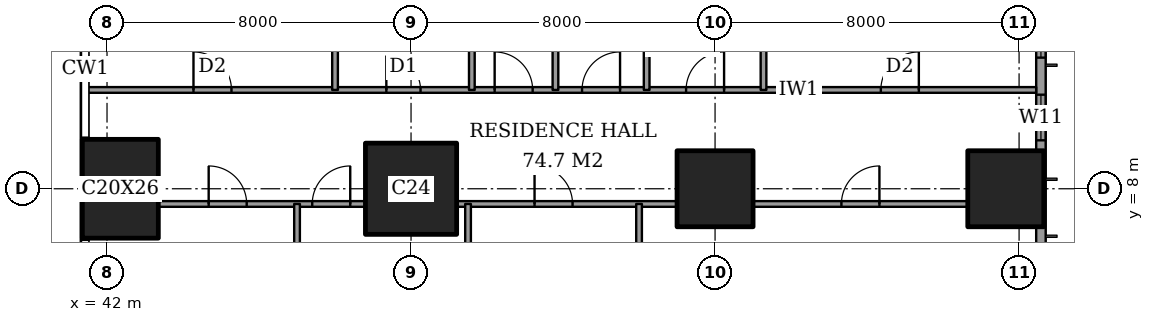
"""IFC4 building model, lengths in metres.
Left out: names, types, materials, properties, quantities, classifications, styles, units other than length and angle.
Written with IfcOpenShell. Run it as: python <this file> out.ifc"""

import sys

from ifc_helpers import new_model, si_unit, direction, frame, frame_2d, origin, origin_2d, place, context, subcontext, project, spatial, rectangle, extrude, element, fill, save


model = new_model("IFC4")
c1 = context("Model", 3, precision=1e-05, world=origin(), true_north=direction((0.0, 1.0)))
c2 = subcontext(c1, "Body", "Model", "MODEL_VIEW")
j1 = project(units=[si_unit("LENGTHUNIT", "METRE"), si_unit("PLANEANGLEUNIT", "RADIAN")], contexts=[c1])
p1 = place(None, origin())
s1 = spatial("IfcSite", under=j1, at=p1, CompositionType="ELEMENT")
p2 = place(p1, origin())
s2 = spatial("IfcBuilding", under=s1, at=p2, CompositionType="ELEMENT")
p3 = place(p2, frame((0.0, 0.0, 110.6)))
s3 = spatial("IfcBuildingStorey", under=s2, at=p3, CompositionType="ELEMENT", Elevation=110.6)
p4 = place(p3, frame((42.35, 8.0, 0.0), z_axis=(0.0, 0.0, 1.0), x_axis=(1.0, 0.0, 0.0)))
e1 = element("IfcColumn", 1, at=p4, inside=s3, PredefinedType="COLUMN", context=c2, shape_type="SweptSolid", body=[
    extrude(rectangle(XDim=2.0, YDim=2.6, at=origin_2d()), origin(), (0.0, 0.0, 1.0), 3.6),
])
p5 = place(p3, frame((50.0, 8.0, 0.0), z_axis=(0.0, 0.0, 1.0), x_axis=(1.0, 0.0, 0.0)))
e2 = element("IfcColumn", 2, at=p5, inside=s3, PredefinedType="COLUMN", context=c2, shape_type="SweptSolid", body=[
    extrude(rectangle(XDim=2.4, YDim=2.4, at=origin_2d()), origin(), (0.0, 0.0, 1.0), 3.6),
])
for number, where, z_axis, x_axis in (
    (3, (58.0, 8.0, 0.0), (0.0, 0.0, 1.0), (1.0, 0.0, 0.0)),
    (4, (65.65, 8.0, 0.0), (0.0, 0.0, 1.0), (1.0, 0.0, 0.0)),
):
    element("IfcColumn", number, at=place(p3, frame(where, z_axis=z_axis, x_axis=x_axis)), inside=s3, PredefinedType="COLUMN", context=c2, shape_type="SweptSolid", body=[
        extrude(rectangle(XDim=2.0, YDim=2.0, at=origin_2d()), origin(), (0.0, 0.0, 1.0), 3.6),
    ])
p6 = place(p3, frame((66.575, 3.175, 0.0), z_axis=(0.0, 0.0, 1.0), x_axis=(0.0, 1.0, 0.0)))
e5 = element("IfcWall", 5, at=p6, inside=s3, PredefinedType="SOLIDWALL", context=c2, shape_type="SweptSolid", body=[
    extrude(rectangle(XDim=41.65, YDim=0.25, at=frame_2d((20.825, 0.0))), origin(), (0.0, 0.0, 1.0), 3.6),
])
p7 = place(p6, frame((0.775, 0.0, 0.4)))
e6 = element("IfcOpeningElement", 6, at=p7, cuts=e5, PredefinedType="OPENING", context=c2, shape_type="SweptSolid", body=[
    extrude(rectangle(XDim=2.4, YDim=2.2, at=frame_2d((1.2, 1.1))), frame((0.0, 0.135, 0.0), z_axis=(0.0, -1.0, 0.0), x_axis=(1.0, 0.0, 0.0)), (0.0, 0.0, 1.0), 0.27),
])
p8 = place(p6, frame((6.1, 0.0, 0.4)))
e7 = element("IfcOpeningElement", 7, at=p8, cuts=e5, PredefinedType="OPENING", context=c2, shape_type="SweptSolid", body=[
    extrude(rectangle(XDim=1.2, YDim=2.2, at=frame_2d((0.6, 1.1))), frame((0.0, 0.135, 0.0), z_axis=(0.0, -1.0, 0.0), x_axis=(1.0, 0.0, 0.0)), (0.0, 0.0, 1.0), 0.27),
])
p9 = place(p6, frame((8.275, 0.0, 0.4)))
e8 = element("IfcOpeningElement", 8, at=p9, cuts=e5, PredefinedType="OPENING", context=c2, shape_type="SweptSolid", body=[
    extrude(rectangle(XDim=2.4, YDim=2.2, at=frame_2d((1.2, 1.1))), frame((0.0, 0.135, 0.0), z_axis=(0.0, -1.0, 0.0), x_axis=(1.0, 0.0, 0.0)), (0.0, 0.0, 1.0), 0.27),
])
p10 = place(p6, frame((15.775, 0.0, 0.4)))
e9 = element("IfcOpeningElement", 9, at=p10, cuts=e5, PredefinedType="OPENING", context=c2, shape_type="SweptSolid", body=[
    extrude(rectangle(XDim=2.4, YDim=2.2, at=frame_2d((1.2, 1.1))), frame((0.0, 0.135, 0.0), z_axis=(0.0, -1.0, 0.0), x_axis=(1.0, 0.0, 0.0)), (0.0, 0.0, 1.0), 0.27),
])
p11 = place(p6, frame((23.475, 0.0, 0.4)))
e10 = element("IfcOpeningElement", 10, at=p11, cuts=e5, PredefinedType="OPENING", context=c2, shape_type="SweptSolid", body=[
    extrude(rectangle(XDim=2.4, YDim=2.2, at=frame_2d((1.2, 1.1))), frame((0.0, 0.135, 0.0), z_axis=(0.0, -1.0, 0.0), x_axis=(1.0, 0.0, 0.0)), (0.0, 0.0, 1.0), 0.27),
])
p12 = place(p6, frame((30.975, 0.0, 0.4)))
e11 = element("IfcOpeningElement", 11, at=p12, cuts=e5, PredefinedType="OPENING", context=c2, shape_type="SweptSolid", body=[
    extrude(rectangle(XDim=2.4, YDim=2.2, at=frame_2d((1.2, 1.1))), frame((0.0, 0.135, 0.0), z_axis=(0.0, -1.0, 0.0), x_axis=(1.0, 0.0, 0.0)), (0.0, 0.0, 1.0), 0.27),
])
p13 = place(p6, frame((34.5, 0.0, 0.4)))
e12 = element("IfcOpeningElement", 12, at=p13, cuts=e5, PredefinedType="OPENING", context=c2, shape_type="SweptSolid", body=[
    extrude(rectangle(XDim=1.2, YDim=2.2, at=frame_2d((0.6, 1.1))), frame((0.0, 0.135, 0.0), z_axis=(0.0, -1.0, 0.0), x_axis=(1.0, 0.0, 0.0)), (0.0, 0.0, 1.0), 0.27),
])
p14 = place(p6, frame((38.475, 0.0, 0.4)))
e13 = element("IfcOpeningElement", 13, at=p14, cuts=e5, PredefinedType="OPENING", context=c2, shape_type="SweptSolid", body=[
    extrude(rectangle(XDim=2.4, YDim=2.2, at=frame_2d((1.2, 1.1))), frame((0.0, 0.135, 0.0), z_axis=(0.0, -1.0, 0.0), x_axis=(1.0, 0.0, 0.0)), (0.0, 0.0, 1.0), 0.27),
])
p15 = place(p3, frame((43.35, 7.6, 0.0), z_axis=(0.0, 0.0, 1.0), x_axis=(1.0, 0.0, 0.0)))
e14 = element("IfcWall", 14, at=p15, inside=s3, PredefinedType="PARTITIONING", context=c2, shape_type="SweptSolid", body=[
    extrude(rectangle(XDim=5.45, YDim=0.15, at=frame_2d((2.725, 0.0))), origin(), (0.0, 0.0, 1.0), 3.35),
])
p16 = place(p15, frame((4.05, 0.0, 0.0)))
e15 = element("IfcOpeningElement", 15, at=p16, cuts=e14, PredefinedType="OPENING", context=c2, shape_type="SweptSolid", body=[
    extrude(rectangle(XDim=1.0, YDim=2.1, at=frame_2d((0.5, 1.05))), frame((0.0, 0.085, 0.0), z_axis=(0.0, -1.0, 0.0), x_axis=(1.0, 0.0, 0.0)), (0.0, 0.0, 1.0), 0.17),
])
p17 = place(p15, frame((1.325, 0.0, 0.0)))
e16 = element("IfcOpeningElement", 16, at=p17, cuts=e14, PredefinedType="OPENING", context=c2, shape_type="SweptSolid", body=[
    extrude(rectangle(XDim=1.0, YDim=2.1, at=frame_2d((0.5, 1.05))), frame((0.0, 0.085, 0.0), z_axis=(0.0, -1.0, 0.0), x_axis=(1.0, 0.0, 0.0)), (0.0, 0.0, 1.0), 0.17),
])
p18 = place(p3, frame((51.2, 7.6, 0.0), z_axis=(0.0, 0.0, 1.0), x_axis=(1.0, 0.0, 0.0)))
e17 = element("IfcWall", 17, at=p18, inside=s3, PredefinedType="PARTITIONING", context=c2, shape_type="SweptSolid", body=[
    extrude(rectangle(XDim=5.8, YDim=0.15, at=frame_2d((2.9, 0.0))), origin(), (0.0, 0.0, 1.0), 3.35),
])
p19 = place(p18, frame((2.05, 0.0, 0.0)))
e18 = element("IfcOpeningElement", 18, at=p19, cuts=e17, PredefinedType="OPENING", context=c2, shape_type="SweptSolid", body=[
    extrude(rectangle(XDim=1.0, YDim=2.1, at=frame_2d((0.5, 1.05))), frame((0.0, 0.085, 0.0), z_axis=(0.0, -1.0, 0.0), x_axis=(1.0, 0.0, 0.0)), (0.0, 0.0, 1.0), 0.17),
])
p20 = place(p3, frame((59.0, 7.6, 0.0), z_axis=(0.0, 0.0, 1.0), x_axis=(1.0, 0.0, 0.0)))
e19 = element("IfcWall", 19, at=p20, inside=s3, PredefinedType="PARTITIONING", context=c2, shape_type="SweptSolid", body=[
    extrude(rectangle(XDim=5.65, YDim=0.15, at=frame_2d((2.825, 0.0))), origin(), (0.0, 0.0, 1.0), 3.35),
])
p21 = place(p20, frame((2.325, 0.0, 0.0)))
e20 = element("IfcOpeningElement", 20, at=p21, cuts=e19, PredefinedType="OPENING", context=c2, shape_type="SweptSolid", body=[
    extrude(rectangle(XDim=1.0, YDim=2.1, at=frame_2d((0.5, 1.05))), frame((0.0, 0.085, 0.0), z_axis=(0.0, -1.0, 0.0), x_axis=(1.0, 0.0, 0.0)), (0.0, 0.0, 1.0), 0.17),
])
p22 = place(p3, frame((41.439, 10.6, 0.0), z_axis=(0.0, 0.0, 1.0), x_axis=(1.0, 0.0, 0.0)))
e21 = element("IfcWall", 21, at=p22, inside=s3, PredefinedType="PARTITIONING", context=c2, shape_type="SweptSolid", body=[
    extrude(rectangle(XDim=25.011, YDim=0.15, at=frame_2d((12.505, 0.0))), origin(), (0.0, 0.0, 1.0), 3.35),
])
p23 = place(p22, frame((10.761, 0.0, 0.0)))
e22 = element("IfcOpeningElement", 22, at=p23, cuts=e21, PredefinedType="OPENING", context=c2, shape_type="SweptSolid", body=[
    extrude(rectangle(XDim=1.0, YDim=2.1, at=frame_2d((0.5, 1.05))), frame((0.0, 0.085, 0.0), z_axis=(0.0, -1.0, 0.0), x_axis=(1.0, 0.0, 0.0)), (0.0, 0.0, 1.0), 0.17),
])
p24 = place(p22, frame((20.924, 0.0, 0.0)))
e23 = element("IfcOpeningElement", 23, at=p24, cuts=e21, PredefinedType="OPENING", context=c2, shape_type="SweptSolid", body=[
    extrude(rectangle(XDim=1.0, YDim=2.1, at=frame_2d((0.5, 1.05))), frame((0.0, 0.085, 0.0), z_axis=(0.0, -1.0, 0.0), x_axis=(1.0, 0.0, 0.0)), (0.0, 0.0, 1.0), 0.17),
])
p25 = place(p22, frame((15.799, 0.0, 0.0)))
e24 = element("IfcOpeningElement", 24, at=p25, cuts=e21, PredefinedType="OPENING", context=c2, shape_type="SweptSolid", body=[
    extrude(rectangle(XDim=1.0, YDim=2.1, at=frame_2d((0.5, 1.05))), frame((0.0, 0.085, 0.0), z_axis=(0.0, -1.0, 0.0), x_axis=(1.0, 0.0, 0.0)), (0.0, 0.0, 1.0), 0.17),
])
p26 = place(p22, frame((13.061, 0.0, 0.0)))
e25 = element("IfcOpeningElement", 25, at=p26, cuts=e21, PredefinedType="OPENING", context=c2, shape_type="SweptSolid", body=[
    extrude(rectangle(XDim=1.0, YDim=2.1, at=frame_2d((0.5, 1.05))), frame((0.0, 0.085, 0.0), z_axis=(0.0, -1.0, 0.0), x_axis=(1.0, 0.0, 0.0)), (0.0, 0.0, 1.0), 0.17),
])
p27 = place(p22, frame((7.911, 0.0, 0.0)))
e26 = element("IfcOpeningElement", 26, at=p27, cuts=e21, PredefinedType="OPENING", context=c2, shape_type="SweptSolid", body=[
    extrude(rectangle(XDim=0.9, YDim=2.1, at=frame_2d((0.45, 1.05))), frame((0.0, 0.085, 0.0), z_axis=(0.0, -1.0, 0.0), x_axis=(1.0, 0.0, 0.0)), (0.0, 0.0, 1.0), 0.17),
])
p28 = place(p22, frame((2.836, 0.0, 0.0)))
e27 = element("IfcOpeningElement", 27, at=p28, cuts=e21, PredefinedType="OPENING", context=c2, shape_type="SweptSolid", body=[
    extrude(rectangle(XDim=1.0, YDim=2.1, at=frame_2d((0.5, 1.05))), frame((0.0, 0.085, 0.0), z_axis=(0.0, -1.0, 0.0), x_axis=(1.0, 0.0, 0.0)), (0.0, 0.0, 1.0), 0.17),
])
p29 = place(p3, frame((47.0, -0.45, 0.0), z_axis=(0.0, 0.0, 1.0), x_axis=(0.0, 1.0, 0.0)))
e28 = element("IfcWall", 28, at=p29, inside=s3, PredefinedType="PARTITIONING", context=c2, shape_type="SweptSolid", body=[
    extrude(rectangle(XDim=8.05, YDim=0.15, at=frame_2d((4.025, 0.0))), origin(), (0.0, 0.0, 1.0), 3.35),
])
p30 = place(p3, frame((48.0, 10.6, 0.0), z_axis=(0.0, 0.0, 1.0), x_axis=(0.0, 1.0, 0.0)))
e29 = element("IfcWall", 29, at=p30, inside=s3, PredefinedType="PARTITIONING", context=c2, shape_type="SweptSolid", body=[
    extrude(rectangle(XDim=13.4, YDim=0.15, at=frame_2d((6.7, 0.0))), origin(), (0.0, 0.0, 1.0), 3.35),
])
p31 = place(p30, frame((10.8, 0.0, 0.0)))
e30 = element("IfcOpeningElement", 30, at=p31, cuts=e29, PredefinedType="OPENING", context=c2, shape_type="SweptSolid", body=[
    extrude(rectangle(XDim=1.2, YDim=2.4, at=frame_2d((0.6, 1.2))), frame((0.0, 0.085, 0.0), z_axis=(0.0, -1.0, 0.0), x_axis=(1.0, 0.0, 0.0)), (0.0, 0.0, 1.0), 0.17),
])
p32 = place(p30, frame((6.7, 0.0, 0.0)))
e31 = element("IfcOpeningElement", 31, at=p32, cuts=e29, PredefinedType="OPENING", context=c2, shape_type="SweptSolid", body=[
    extrude(rectangle(XDim=0.9, YDim=2.1, at=frame_2d((0.45, 1.05))), frame((0.0, 0.085, 0.0), z_axis=(0.0, -1.0, 0.0), x_axis=(1.0, 0.0, 0.0)), (0.0, 0.0, 1.0), 0.17),
])
p33 = place(p3, frame((51.5, -0.45, 0.0), z_axis=(0.0, 0.0, 1.0), x_axis=(0.0, 1.0, 0.0)))
e32 = element("IfcWall", 32, at=p33, inside=s3, PredefinedType="PARTITIONING", context=c2, shape_type="SweptSolid", body=[
    extrude(rectangle(XDim=8.05, YDim=0.15, at=frame_2d((4.025, 0.0))), origin(), (0.0, 0.0, 1.0), 3.35),
])
for number, where, z_axis, x_axis in (
    (33, (51.6, 10.6, 0.0), (0.0, 0.0, 1.0), (0.0, 1.0, 0.0)),
    (34, (53.8, 10.6, 0.0), (0.0, 0.0, 1.0), (0.0, 1.0, 0.0)),
):
    element("IfcWall", number, at=place(p3, frame(where, z_axis=z_axis, x_axis=x_axis)), inside=s3, PredefinedType="PARTITIONING", context=c2, shape_type="SweptSolid", body=[
        extrude(rectangle(XDim=4.0, YDim=0.15, at=frame_2d((2.0, 0.0))), origin(), (0.0, 0.0, 1.0), 3.35),
    ])
p34 = place(p3, frame((56.0, -0.45, 0.0), z_axis=(0.0, 0.0, 1.0), x_axis=(0.0, 1.0, 0.0)))
e35 = element("IfcWall", 35, at=p34, inside=s3, PredefinedType="PARTITIONING", context=c2, shape_type="SweptSolid", body=[
    extrude(rectangle(XDim=8.05, YDim=0.15, at=frame_2d((4.025, 0.0))), origin(), (0.0, 0.0, 1.0), 3.35),
])
p35 = place(p3, frame((56.2, 10.6, 0.0), z_axis=(0.0, 0.0, 1.0), x_axis=(0.0, 1.0, 0.0)))
e36 = element("IfcWall", 36, at=p35, inside=s3, PredefinedType="PARTITIONING", context=c2, shape_type="SweptSolid", body=[
    extrude(rectangle(XDim=11.0, YDim=0.15, at=frame_2d((5.5, 0.0))), origin(), (0.0, 0.0, 1.0), 3.35),
])
p36 = place(p35, frame((7.0, 0.0, 0.0)))
e37 = element("IfcOpeningElement", 37, at=p36, cuts=e36, PredefinedType="OPENING", context=c2, shape_type="SweptSolid", body=[
    extrude(rectangle(XDim=1.0, YDim=2.1, at=frame_2d((0.5, 1.05))), frame((0.0, 0.085, 0.0), z_axis=(0.0, -1.0, 0.0), x_axis=(1.0, 0.0, 0.0)), (0.0, 0.0, 1.0), 0.17),
])
p37 = place(p3, frame((59.275, 10.6, 0.0), z_axis=(0.0, 0.0, 1.0), x_axis=(0.0, 1.0, 0.0)))
e38 = element("IfcWall", 38, at=p37, inside=s3, PredefinedType="PARTITIONING", context=c2, shape_type="SweptSolid", body=[
    extrude(rectangle(XDim=4.2, YDim=0.15, at=frame_2d((2.1, 0.0))), origin(), (0.0, 0.0, 1.0), 3.35),
])
p38 = place(p8, origin())
e39 = element("IfcWindow", 39, at=p38, inside=s3, PartitioningType="SINGLE_PANEL", PredefinedType="WINDOW", context=c2, shape_type="SweptSolid", body=[
    extrude(rectangle(XDim=1.2, YDim=2.2, at=frame_2d((0.6, 1.1))), frame((0.0, 0.03, 0.0), z_axis=(0.0, -1.0, 0.0), x_axis=(1.0, 0.0, 0.0)), (0.0, 0.0, 1.0), 0.06),
])
fill(e7, e39)
p39 = place(p9, origin())
e40 = element("IfcWindow", 40, at=p39, inside=s3, PartitioningType="SINGLE_PANEL", PredefinedType="WINDOW", context=c2, shape_type="SweptSolid", body=[
    extrude(rectangle(XDim=2.4, YDim=2.2, at=frame_2d((1.2, 1.1))), frame((0.0, 0.03, 0.0), z_axis=(0.0, -1.0, 0.0), x_axis=(1.0, 0.0, 0.0)), (0.0, 0.0, 1.0), 0.06),
])
fill(e8, e40)
p40 = place(p21, origin())
e41 = element("IfcDoor", 41, at=p40, inside=s3, OperationType="SINGLE_SWING_LEFT", PredefinedType="DOOR", context=c2, shape_type="SweptSolid", body=[
    extrude(rectangle(XDim=1.0, YDim=2.1, at=frame_2d((0.5, 1.05))), frame((0.0, 0.025, 0.0), z_axis=(0.0, -1.0, 0.0), x_axis=(1.0, 0.0, 0.0)), (0.0, 0.0, 1.0), 0.05),
])
fill(e20, e41)
p41 = place(p19, origin())
e42 = element("IfcDoor", 42, at=p41, inside=s3, OperationType="SINGLE_SWING_RIGHT", PredefinedType="DOOR", context=c2, shape_type="SweptSolid", body=[
    extrude(rectangle(XDim=1.0, YDim=2.1, at=frame_2d((0.5, 1.05))), frame((0.0, 0.025, 0.0), z_axis=(0.0, -1.0, 0.0), x_axis=(1.0, 0.0, 0.0)), (0.0, 0.0, 1.0), 0.05),
])
fill(e18, e42)
p42 = place(p16, origin())
e43 = element("IfcDoor", 43, at=p42, inside=s3, OperationType="SINGLE_SWING_LEFT", PredefinedType="DOOR", context=c2, shape_type="SweptSolid", body=[
    extrude(rectangle(XDim=1.0, YDim=2.1, at=frame_2d((0.5, 1.05))), frame((0.0, 0.025, 0.0), z_axis=(0.0, -1.0, 0.0), x_axis=(1.0, 0.0, 0.0)), (0.0, 0.0, 1.0), 0.05),
])
fill(e15, e43)
p43 = place(p17, origin())
e44 = element("IfcDoor", 44, at=p43, inside=s3, OperationType="SINGLE_SWING_RIGHT", PredefinedType="DOOR", context=c2, shape_type="SweptSolid", body=[
    extrude(rectangle(XDim=1.0, YDim=2.1, at=frame_2d((0.5, 1.05))), frame((0.0, 0.025, 0.0), z_axis=(0.0, -1.0, 0.0), x_axis=(1.0, 0.0, 0.0)), (0.0, 0.0, 1.0), 0.05),
])
fill(e16, e44)
p44 = place(p23, origin())
e45 = element("IfcDoor", 45, at=p44, inside=s3, OperationType="SINGLE_SWING_RIGHT", PredefinedType="DOOR", context=c2, shape_type="SweptSolid", body=[
    extrude(rectangle(XDim=1.0, YDim=2.1, at=frame_2d((0.5, 1.05))), frame((0.0, 0.025, 0.0), z_axis=(0.0, -1.0, 0.0), x_axis=(1.0, 0.0, 0.0)), (0.0, 0.0, 1.0), 0.05),
])
fill(e22, e45)
p45 = place(p24, origin())
e46 = element("IfcDoor", 46, at=p45, inside=s3, OperationType="SINGLE_SWING_LEFT", PredefinedType="DOOR", context=c2, shape_type="SweptSolid", body=[
    extrude(rectangle(XDim=1.0, YDim=2.1, at=frame_2d((0.5, 1.05))), frame((0.0, 0.025, 0.0), z_axis=(0.0, -1.0, 0.0), x_axis=(1.0, 0.0, 0.0)), (0.0, 0.0, 1.0), 0.05),
])
fill(e23, e46)
p46 = place(p25, origin())
e47 = element("IfcDoor", 47, at=p46, inside=s3, OperationType="SINGLE_SWING_LEFT", PredefinedType="DOOR", context=c2, shape_type="SweptSolid", body=[
    extrude(rectangle(XDim=1.0, YDim=2.1, at=frame_2d((0.5, 1.05))), frame((0.0, 0.025, 0.0), z_axis=(0.0, -1.0, 0.0), x_axis=(1.0, 0.0, 0.0)), (0.0, 0.0, 1.0), 0.05),
])
fill(e24, e47)
p47 = place(p26, origin())
e48 = element("IfcDoor", 48, at=p47, inside=s3, OperationType="SINGLE_SWING_LEFT", PredefinedType="DOOR", context=c2, shape_type="SweptSolid", body=[
    extrude(rectangle(XDim=1.0, YDim=2.1, at=frame_2d((0.5, 1.05))), frame((0.0, 0.025, 0.0), z_axis=(0.0, -1.0, 0.0), x_axis=(1.0, 0.0, 0.0)), (0.0, 0.0, 1.0), 0.05),
])
fill(e25, e48)
p48 = place(p27, origin())
e49 = element("IfcDoor", 49, at=p48, inside=s3, OperationType="SINGLE_SWING_RIGHT", PredefinedType="DOOR", context=c2, shape_type="SweptSolid", body=[
    extrude(rectangle(XDim=0.9, YDim=2.1, at=frame_2d((0.45, 1.05))), frame((0.0, 0.025, 0.0), z_axis=(0.0, -1.0, 0.0), x_axis=(1.0, 0.0, 0.0)), (0.0, 0.0, 1.0), 0.05),
])
fill(e26, e49)
p49 = place(p28, origin())
e50 = element("IfcDoor", 50, at=p49, inside=s3, OperationType="SINGLE_SWING_RIGHT", PredefinedType="DOOR", context=c2, shape_type="SweptSolid", body=[
    extrude(rectangle(XDim=1.0, YDim=2.1, at=frame_2d((0.5, 1.05))), frame((0.0, 0.025, 0.0), z_axis=(0.0, -1.0, 0.0), x_axis=(1.0, 0.0, 0.0)), (0.0, 0.0, 1.0), 0.05),
])
fill(e27, e50)
save(model, sys.argv[1])
